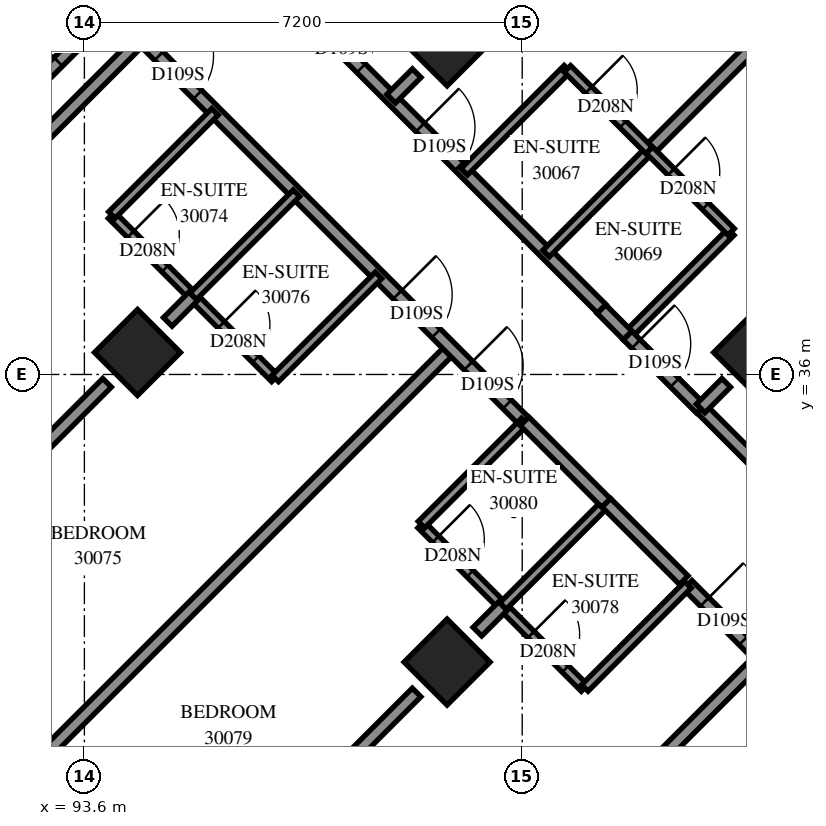
"""IFC4 building model, lengths in metres.
Left out: names, types, materials, properties, quantities, classifications, styles, units other than length and angle.
Written with IfcOpenShell. Run it as: python <this file> out.ifc"""

import sys

from ifc_helpers import new_model, si_unit, direction, frame, frame_2d, origin, origin_2d, place, context, subcontext, project, spatial, rectangle, extrude, element, fill, save


model = new_model("IFC4")
c1 = context("Model", 3, precision=1e-05, world=origin(), true_north=direction((0.0, 1.0)))
c2 = subcontext(c1, "Body", "Model", "MODEL_VIEW")
j1 = project(units=[si_unit("LENGTHUNIT", "METRE"), si_unit("PLANEANGLEUNIT", "RADIAN")], contexts=[c1])
p1 = place(None, origin())
s1 = spatial("IfcSite", under=j1, at=p1, CompositionType="ELEMENT")
p2 = place(p1, origin())
s2 = spatial("IfcBuilding", under=s1, at=p2, CompositionType="ELEMENT")
p3 = place(p2, frame((0.0, 0.0, 111.8)))
s3 = spatial("IfcBuildingStorey", under=s2, at=p3, CompositionType="ELEMENT", Elevation=111.8)
for number, where, z_axis, x_axis in (
    (1, (99.565, 41.453, 0.0), (0.0, 0.0, 1.0), (0.707, -0.707, 0.0)),
    (2, (94.474, 36.362, 0.0), (0.0, 0.0, 1.0), (0.707, -0.707, 0.0)),
    (3, (104.656, 36.362, 0.0), (0.0, 0.0, 1.0), (0.707, -0.707, 0.0)),
    (4, (99.565, 31.271, 0.0), (0.0, 0.0, 1.0), (0.707, -0.707, 0.0)),
):
    element("IfcColumn", number, at=place(p3, frame(where, z_axis=z_axis, x_axis=x_axis)), inside=s3, PredefinedType="COLUMN", context=c2, shape_type="SweptSolid", body=[
        extrude(rectangle(XDim=1.0, YDim=1.0, at=origin_2d()), origin(), (0.0, 0.0, 1.0), 3.1),
    ])
p4 = place(p3, frame((87.12, 38.625, -0.3), z_axis=(0.0, 0.0, 1.0), x_axis=(0.7071067812, 0.7071067812, 0.0)))
e5 = element("IfcWall", 5, at=p4, inside=s3, PredefinedType="SHEAR", context=c2, shape_type="SweptSolid", body=[
    extrude(rectangle(XDim=14.4, YDim=0.8, at=frame_2d((7.2, 0.0))), origin(), (0.0, 0.0, 1.0), 2.7),
])
p5 = place(p4, frame((4.55, 0.0, 0.3)))
e6 = element("IfcOpeningElement", 6, at=p5, cuts=e5, PredefinedType="OPENING", context=c2, shape_type="SweptSolid", body=[
    extrude(rectangle(XDim=1.1, YDim=2.1, at=frame_2d((0.55, 1.05))), frame((0.0, 0.41, 0.0), z_axis=(0.0, -1.0, 0.0), x_axis=(1.0, 0.0, 0.0)), (0.0, 0.0, 1.0), 0.82),
])
p6 = place(p4, frame((11.35, 0.0, 0.3)))
e7 = element("IfcOpeningElement", 7, at=p6, cuts=e5, PredefinedType="OPENING", context=c2, shape_type="SweptSolid", body=[
    extrude(rectangle(XDim=1.1, YDim=2.1, at=frame_2d((0.55, 1.05))), frame((0.0, 0.41, 0.0), z_axis=(0.0, -1.0, 0.0), x_axis=(1.0, 0.0, 0.0)), (0.0, 0.0, 1.0), 0.82),
])
p7 = place(p3, frame((96.474, 23.09, 0.0), z_axis=(0.0, 0.0, 1.0), x_axis=(0.7071067812, 0.7071067812, 0.0)))
e8 = element("IfcWall", 8, at=p7, inside=s3, PredefinedType="PARTITIONING", context=c2, shape_type="SweptSolid", body=[
    extrude(rectangle(XDim=11.67, YDim=0.2, at=frame_2d((5.835, 0.0))), origin(), (0.0, 0.0, 1.0), 3.1),
])
p8 = place(p3, frame((86.331, 33.312, 0.0), z_axis=(0.0, 0.0, 1.0), x_axis=(0.707102476, 0.7071110864, 0.0)))
e9 = element("IfcWall", 9, at=p8, inside=s3, PredefinedType="PARTITIONING", context=c2, shape_type="SweptSolid", body=[
    extrude(rectangle(XDim=11.614, YDim=0.2, at=frame_2d((5.807, 0.0))), origin(), (0.0, 0.0, 1.0), 3.1),
])
p9 = place(p3, frame((91.452, 28.25, 0.0), z_axis=(0.0, 0.0, 1.0), x_axis=(0.7071931897, 0.7070203621, 0.0)))
e10 = element("IfcWall", 10, at=p9, inside=s3, PredefinedType="PARTITIONING", context=c2, shape_type="SweptSolid", body=[
    extrude(rectangle(XDim=11.572, YDim=0.2, at=frame_2d((5.786, 0.0))), origin(), (0.0, 0.0, 1.0), 3.1),
])
p10 = place(p3, frame((86.835, 34.806, 0.0), z_axis=(0.0, 0.0, 1.0), x_axis=(0.7071067812, 0.7071067812, 0.0)))
e11 = element("IfcWall", 11, at=p10, inside=s3, PredefinedType="PARTITIONING", context=c2, shape_type="SweptSolid", body=[
    extrude(rectangle(XDim=10.201, YDim=0.2, at=frame_2d((5.1, 0.0))), origin(), (0.0, 0.0, 1.0), 3.1),
])
p11 = place(p10, frame((8.959, 0.0, 0.0)))
e12 = element("IfcOpeningElement", 12, at=p11, cuts=e11, PredefinedType="OPENING", context=c2, shape_type="SweptSolid", body=[
    extrude(rectangle(XDim=1.0, YDim=2.1, at=frame_2d((0.5, 1.05))), frame((0.0, 0.11, 0.0), z_axis=(0.0, -1.0, 0.0), x_axis=(1.0, 0.0, 0.0)), (0.0, 0.0, 1.0), 0.22),
])
p12 = place(p3, frame((94.047, 42.015, 0.0), z_axis=(0.0, 0.0, 1.0), x_axis=(0.7071067812, -0.7071067812, 0.0)))
e13 = element("IfcWall", 13, at=p12, inside=s3, PredefinedType="PARTITIONING", context=c2, shape_type="SweptSolid", body=[
    extrude(rectangle(XDim=9.6, YDim=0.2, at=frame_2d((4.8, 0.0))), origin(), (0.0, 0.0, 1.0), 3.1),
])
p13 = place(p12, frame((1.099, 0.0, 0.0)))
e14 = element("IfcOpeningElement", 14, at=p13, cuts=e13, PredefinedType="OPENING", context=c2, shape_type="SweptSolid", body=[
    extrude(rectangle(XDim=0.9, YDim=2.1, at=frame_2d((0.45, 1.05))), frame((0.0, 0.11, 0.0), z_axis=(0.0, -1.0, 0.0), x_axis=(1.0, 0.0, 0.0)), (0.0, 0.0, 1.0), 0.22),
])
p14 = place(p12, frame((6.649, 0.0, 0.0)))
e15 = element("IfcOpeningElement", 15, at=p14, cuts=e13, PredefinedType="OPENING", context=c2, shape_type="SweptSolid", body=[
    extrude(rectangle(XDim=0.9, YDim=2.1, at=frame_2d((0.45, 1.05))), frame((0.0, 0.11, 0.0), z_axis=(0.0, -1.0, 0.0), x_axis=(1.0, 0.0, 0.0)), (0.0, 0.0, 1.0), 0.22),
])
p15 = place(p12, frame((8.3, 0.0, 0.0)))
e16 = element("IfcOpeningElement", 16, at=p15, cuts=e13, PredefinedType="OPENING", context=c2, shape_type="SweptSolid", body=[
    extrude(rectangle(XDim=0.9, YDim=2.1, at=frame_2d((0.45, 1.05))), frame((0.0, 0.11, 0.0), z_axis=(0.0, -1.0, 0.0), x_axis=(1.0, 0.0, 0.0)), (0.0, 0.0, 1.0), 0.22),
])
p16 = place(p3, frame((96.103, 43.083, 0.0), z_axis=(0.0, 0.0, 1.0), x_axis=(0.7071067812, -0.7071067812, 0.0)))
e17 = element("IfcWall", 17, at=p16, inside=s3, PredefinedType="PARTITIONING", context=c2, shape_type="SweptSolid", body=[
    extrude(rectangle(XDim=8.491, YDim=0.2, at=frame_2d((4.245, 0.0))), origin(), (0.0, 0.0, 1.0), 3.1),
])
p17 = place(p16, frame((1.995, 0.0, 0.0)))
e18 = element("IfcOpeningElement", 18, at=p17, cuts=e17, PredefinedType="OPENING", context=c2, shape_type="SweptSolid", body=[
    extrude(rectangle(XDim=0.9, YDim=2.1, at=frame_2d((0.45, 1.05))), frame((0.0, 0.11, 0.0), z_axis=(0.0, -1.0, 0.0), x_axis=(1.0, 0.0, 0.0)), (0.0, 0.0, 1.0), 0.22),
])
p18 = place(p16, frame((4.27, 0.0, 0.0)))
e19 = element("IfcOpeningElement", 19, at=p18, cuts=e17, PredefinedType="OPENING", context=c2, shape_type="SweptSolid", body=[
    extrude(rectangle(XDim=0.9, YDim=2.1, at=frame_2d((0.45, 1.05))), frame((0.0, 0.11, 0.0), z_axis=(0.0, -1.0, 0.0), x_axis=(1.0, 0.0, 0.0)), (0.0, 0.0, 1.0), 0.22),
])
p19 = place(p3, frame((102.888, 39.687, 0.0), z_axis=(0.0, 0.0, 1.0), x_axis=(0.7072515706, 0.7069619621, 0.0)))
e20 = element("IfcWall", 20, at=p19, inside=s3, PredefinedType="PARTITIONING", context=c2, shape_type="SweptSolid", body=[
    extrude(rectangle(XDim=7.251, YDim=0.2, at=frame_2d((3.626, 0.0))), origin(), (0.0, 0.0, 1.0), 3.1),
])
p20 = place(p3, frame((108.831, 30.355, 0.0), z_axis=(0.0, 0.0, 1.0), x_axis=(-0.7073012053, 0.7069123036, 0.0)))
e21 = element("IfcWall", 21, at=p20, inside=s3, PredefinedType="PARTITIONING", context=c2, shape_type="SweptSolid", body=[
    extrude(rectangle(XDim=7.2, YDim=0.2, at=frame_2d((3.6, 0.0))), origin(), (0.0, 0.0, 1.0), 3.1),
])
p21 = place(p20, frame((4.125, 0.0, 0.0)))
e22 = element("IfcOpeningElement", 22, at=p21, cuts=e21, PredefinedType="OPENING", context=c2, shape_type="SweptSolid", body=[
    extrude(rectangle(XDim=1.0, YDim=2.1, at=frame_2d((0.5, 1.05))), frame((0.0, 0.11, 0.0), z_axis=(0.0, -1.0, 0.0), x_axis=(1.0, 0.0, 0.0)), (0.0, 0.0, 1.0), 0.22),
])
p22 = place(p20, frame((0.705, 0.0, 0.0)))
e23 = element("IfcOpeningElement", 23, at=p22, cuts=e21, PredefinedType="OPENING", context=c2, shape_type="SweptSolid", body=[
    extrude(rectangle(XDim=0.9, YDim=2.1, at=frame_2d((0.45, 1.05))), frame((0.0, 0.11, 0.0), z_axis=(0.0, -1.0, 0.0), x_axis=(1.0, 0.0, 0.0)), (0.0, 0.0, 1.0), 0.22),
])
p23 = place(p3, frame((89.881, 31.771, 0.0), z_axis=(0.0, 0.0, 1.0), x_axis=(0.7071067812, 0.7071067812, 0.0)))
e24 = element("IfcWall", 24, at=p23, inside=s3, PredefinedType="PARTITIONING", context=c2, shape_type="SweptSolid", body=[
    extrude(rectangle(XDim=5.787, YDim=0.2, at=frame_2d((2.893, 0.0))), origin(), (0.0, 0.0, 1.0), 3.1),
])
p24 = place(p3, frame((94.973, 26.681, 0.0), z_axis=(0.0, 0.0, 1.0), x_axis=(0.7071067812, 0.7071067812, 0.0)))
e25 = element("IfcWall", 25, at=p24, inside=s3, PredefinedType="PARTITIONING", context=c2, shape_type="SweptSolid", body=[
    extrude(rectangle(XDim=5.784, YDim=0.2, at=frame_2d((2.892, 0.0))), origin(), (0.0, 0.0, 1.0), 3.1),
])
p25 = place(p3, frame((103.521, 32.541, 0.0), z_axis=(0.0, 0.0, 1.0), x_axis=(0.7071067812, -0.7071067812, 0.0)))
e26 = element("IfcWall", 26, at=p25, inside=s3, PredefinedType="PARTITIONING", context=c2, shape_type="SweptSolid", body=[
    extrude(rectangle(XDim=5.301, YDim=0.2, at=frame_2d((2.65, 0.0))), origin(), (0.0, 0.0, 1.0), 3.1),
])
p26 = place(p25, frame((0.396, 0.0, 0.0)))
e27 = element("IfcOpeningElement", 27, at=p26, cuts=e26, PredefinedType="OPENING", context=c2, shape_type="SweptSolid", body=[
    extrude(rectangle(XDim=0.9, YDim=2.1, at=frame_2d((0.45, 1.05))), frame((0.0, 0.11, 0.0), z_axis=(0.0, -1.0, 0.0), x_axis=(1.0, 0.0, 0.0)), (0.0, 0.0, 1.0), 0.22),
])
p27 = place(p3, frame((99.137, 33.531, 0.0), z_axis=(0.0, 0.0, 1.0), x_axis=(0.7071067812, -0.7071067812, 0.0)))
e28 = element("IfcWall", 28, at=p27, inside=s3, PredefinedType="PARTITIONING", context=c2, shape_type="SweptSolid", body=[
    extrude(rectangle(XDim=3.801, YDim=0.15, at=frame_2d((1.901, 0.0))), origin(), (0.0, 0.0, 1.0), 3.1),
])
p28 = place(p27, frame((2.557, 0.0, 0.0)))
e29 = element("IfcOpeningElement", 29, at=p28, cuts=e28, PredefinedType="OPENING", context=c2, shape_type="SweptSolid", body=[
    extrude(rectangle(XDim=0.8, YDim=2.1, at=frame_2d((0.4, 1.05))), frame((0.0, 0.085, 0.0), z_axis=(0.0, -1.0, 0.0), x_axis=(1.0, 0.0, 0.0)), (0.0, 0.0, 1.0), 0.17),
])
p29 = place(p27, frame((0.339, 0.0, 0.0)))
e30 = element("IfcOpeningElement", 30, at=p29, cuts=e28, PredefinedType="OPENING", context=c2, shape_type="SweptSolid", body=[
    extrude(rectangle(XDim=0.8, YDim=2.1, at=frame_2d((0.4, 1.05))), frame((0.0, 0.085, 0.0), z_axis=(0.0, -1.0, 0.0), x_axis=(1.0, 0.0, 0.0)), (0.0, 0.0, 1.0), 0.17),
])
p30 = place(p3, frame((94.047, 38.621, 0.0), z_axis=(0.0, 0.0, 1.0), x_axis=(0.7071067812, -0.7071067812, 0.0)))
e31 = element("IfcWall", 31, at=p30, inside=s3, PredefinedType="PARTITIONING", context=c2, shape_type="SweptSolid", body=[
    extrude(rectangle(XDim=3.799, YDim=0.15, at=frame_2d((1.899, 0.0))), origin(), (0.0, 0.0, 1.0), 3.1),
])
p31 = place(p30, frame((0.444, 0.0, 0.0)))
e32 = element("IfcOpeningElement", 32, at=p31, cuts=e31, PredefinedType="OPENING", context=c2, shape_type="SweptSolid", body=[
    extrude(rectangle(XDim=0.8, YDim=2.1, at=frame_2d((0.4, 1.05))), frame((0.0, 0.085, 0.0), z_axis=(0.0, -1.0, 0.0), x_axis=(1.0, 0.0, 0.0)), (0.0, 0.0, 1.0), 0.17),
])
p32 = place(p30, frame((2.551, 0.0, 0.0)))
e33 = element("IfcOpeningElement", 33, at=p32, cuts=e31, PredefinedType="OPENING", context=c2, shape_type="SweptSolid", body=[
    extrude(rectangle(XDim=0.8, YDim=2.1, at=frame_2d((0.4, 1.05))), frame((0.0, 0.085, 0.0), z_axis=(0.0, -1.0, 0.0), x_axis=(1.0, 0.0, 0.0)), (0.0, 0.0, 1.0), 0.17),
])
p33 = place(p3, frame((102.533, 36.645, 0.0), z_axis=(0.0, 0.0, 1.0), x_axis=(0.7071067812, 0.7071067812, 0.0)))
e34 = element("IfcWall", 34, at=p33, inside=s3, PredefinedType="PARTITIONING", context=c2, shape_type="SweptSolid", body=[
    extrude(rectangle(XDim=2.401, YDim=0.15, at=frame_2d((1.201, 0.0))), origin(), (0.0, 0.0, 1.0), 3.1),
])
for number, where, z_axis, x_axis in (
    (35, (101.192, 37.988, 0.0), (0.0, 0.0, 1.0), (0.707, 0.708, 0.0)),
    (36, (95.389, 37.285, 0.0), (0.0, 0.0, 1.0), (0.708, 0.707, 0.0)),
    (37, (94.052, 38.622, 0.0), (0.0, 0.0, 1.0), (0.707, 0.708, 0.0)),
    (38, (96.739, 35.935, 0.0), (0.0, 0.0, 1.0), (0.708, 0.707, 0.0)),
    (39, (99.143, 33.531, 0.0), (0.0, 0.0, 1.0), (0.708, 0.707, 0.0)),
    (40, (101.83, 30.844, 0.0), (0.0, 0.0, 1.0), (0.707, 0.708, 0.0)),
):
    element("IfcWall", number, at=place(p3, frame(where, z_axis=z_axis, x_axis=x_axis)), inside=s3, PredefinedType="PARTITIONING", context=c2, shape_type="SweptSolid", body=[
        extrude(rectangle(XDim=2.4, YDim=0.15, at=frame_2d((1.2, 0.0))), origin(), (0.0, 0.0, 1.0), 3.1),
    ])
for number, where, z_axis, x_axis in (
    (41, (100.483, 32.191, 0.0), (0.0, 0.0, 1.0), (0.707, 0.707, 0.0)),
    (42, (99.847, 39.333, 0.0), (0.0, 0.0, 1.0), (0.707, 0.707, 0.0)),
):
    element("IfcWall", number, at=place(p3, frame(where, z_axis=z_axis, x_axis=x_axis)), inside=s3, PredefinedType="PARTITIONING", context=c2, shape_type="SweptSolid", body=[
        extrude(rectangle(XDim=2.398, YDim=0.15, at=frame_2d((1.199, 0.0))), origin(), (0.0, 0.0, 1.0), 3.1),
    ])
p34 = place(p3, frame((102.891, 39.69, 0.0), z_axis=(0.0, 0.0, 1.0), x_axis=(0.7071067812, -0.7071067812, 0.0)))
e43 = element("IfcWall", 43, at=p34, inside=s3, PredefinedType="PARTITIONING", context=c2, shape_type="SweptSolid", body=[
    extrude(rectangle(XDim=1.901, YDim=0.15, at=frame_2d((0.95, 0.0))), origin(), (0.0, 0.0, 1.0), 3.1),
])
p35 = place(p34, frame((0.505, 0.0, 0.0)))
e44 = element("IfcOpeningElement", 44, at=p35, cuts=e43, PredefinedType="OPENING", context=c2, shape_type="SweptSolid", body=[
    extrude(rectangle(XDim=0.8, YDim=2.1, at=frame_2d((0.4, 1.05))), frame((0.0, 0.085, 0.0), z_axis=(0.0, -1.0, 0.0), x_axis=(1.0, 0.0, 0.0)), (0.0, 0.0, 1.0), 0.17),
])
p36 = place(p3, frame((100.839, 35.231, 0.0), z_axis=(0.0, 0.0, 1.0), x_axis=(0.7065800724, -0.7076330979, 0.0)))
e45 = element("IfcWall", 45, at=p36, inside=s3, PredefinedType="PARTITIONING", context=c2, shape_type="SweptSolid", body=[
    extrude(rectangle(XDim=1.899, YDim=0.2, at=frame_2d((0.95, 0.0))), origin(), (0.0, 0.0, 1.0), 3.1),
])
p37 = place(p3, frame((101.543, 41.027, 0.0), z_axis=(0.0, 0.0, 1.0), x_axis=(0.7076330979, -0.7065800724, 0.0)))
e46 = element("IfcWall", 46, at=p37, inside=s3, PredefinedType="PARTITIONING", context=c2, shape_type="SweptSolid", body=[
    extrude(rectangle(XDim=1.899, YDim=0.15, at=frame_2d((0.95, 0.0))), origin(), (0.0, 0.0, 1.0), 3.1),
])
p38 = place(p37, frame((0.493, 0.0, 0.0)))
e47 = element("IfcOpeningElement", 47, at=p38, cuts=e46, PredefinedType="OPENING", context=c2, shape_type="SweptSolid", body=[
    extrude(rectangle(XDim=0.8, YDim=2.1, at=frame_2d((0.4, 1.05))), frame((0.0, 0.085, 0.0), z_axis=(0.0, -1.0, 0.0), x_axis=(1.0, 0.0, 0.0)), (0.0, 0.0, 1.0), 0.17),
])
p39 = place(p3, frame((102.183, 33.889, 0.0), z_axis=(0.0, 0.0, 1.0), x_axis=(0.7076620277, -0.7065510983, 0.0)))
e48 = element("IfcWall", 48, at=p39, inside=s3, PredefinedType="PARTITIONING", context=c2, shape_type="SweptSolid", body=[
    extrude(rectangle(XDim=1.8, YDim=0.2, at=frame_2d((0.9, 0.0))), origin(), (0.0, 0.0, 1.0), 3.1),
])
p40 = place(p3, frame((102.531, 36.641, 0.0), z_axis=(0.0, 0.0, 1.0), x_axis=(0.7071067812, -0.7071067812, 0.0)))
e49 = element("IfcWall", 49, at=p40, inside=s3, PredefinedType="PARTITIONING", context=c2, shape_type="SweptSolid", body=[
    extrude(rectangle(XDim=1.7, YDim=0.2, at=frame_2d((0.85, 0.0))), origin(), (0.0, 0.0, 1.0), 3.1),
])
p41 = place(p40, frame((0.198, 0.0, 0.0)))
e50 = element("IfcOpeningElement", 50, at=p41, cuts=e49, PredefinedType="OPENING", context=c2, shape_type="SweptSolid", body=[
    extrude(rectangle(XDim=0.9, YDim=2.1, at=frame_2d((0.45, 1.05))), frame((0.0, 0.11, 0.0), z_axis=(0.0, -1.0, 0.0), x_axis=(1.0, 0.0, 0.0)), (0.0, 0.0, 1.0), 0.22),
])
p42 = place(p3, frame((102.103, 37.075, 0.0), z_axis=(0.0, 0.0, 1.0), x_axis=(0.7054642634, -0.7087454925, 0.0)))
e51 = element("IfcWall", 51, at=p42, inside=s3, PredefinedType="PARTITIONING", context=c2, shape_type="SweptSolid", body=[
    extrude(rectangle(XDim=0.61, YDim=0.2, at=frame_2d((0.305, 0.0))), origin(), (0.0, 0.0, 1.0), 3.1),
])
for number, where, z_axis, x_axis in (
    (52, (98.645, 40.535, 0.0), (0.0, 0.0, 1.0), (0.707, 0.707, 0.0)),
    (53, (100.063, 31.771, 0.0), (0.0, 0.0, 1.0), (0.707, 0.707, 0.0)),
    (54, (103.735, 35.443, 0.0), (0.0, 0.0, 1.0), (0.707, 0.707, 0.0)),
):
    element("IfcWall", number, at=place(p3, frame(where, z_axis=z_axis, x_axis=x_axis)), inside=s3, PredefinedType="PARTITIONING", context=c2, shape_type="SweptSolid", body=[
        extrude(rectangle(XDim=0.594, YDim=0.2, at=frame_2d((0.297, 0.0))), origin(), (0.0, 0.0, 1.0), 3.1),
    ])
p43 = place(p3, frame((94.971, 36.865, 0.0), z_axis=(0.0, 0.0, 1.0), x_axis=(0.7054171665, 0.7087923682, 0.0)))
e55 = element("IfcWall", 55, at=p43, inside=s3, PredefinedType="PARTITIONING", context=c2, shape_type="SweptSolid", body=[
    extrude(rectangle(XDim=0.593, YDim=0.2, at=frame_2d((0.296, 0.0))), origin(), (0.0, 0.0, 1.0), 3.1),
])
p44 = place(p17, origin())
e56 = element("IfcDoor", 56, at=p44, inside=s3, OperationType="SINGLE_SWING_RIGHT", PredefinedType="DOOR", context=c2, shape_type="SweptSolid", body=[
    extrude(rectangle(XDim=0.9, YDim=2.1, at=frame_2d((0.45, 1.05))), frame((0.0, 0.025, 0.0), z_axis=(0.0, -1.0, 0.0), x_axis=(1.0, 0.0, 0.0)), (0.0, 0.0, 1.0), 0.05),
])
fill(e18, e56)
p45 = place(p18, origin())
e57 = element("IfcDoor", 57, at=p45, inside=s3, OperationType="SINGLE_SWING_LEFT", PredefinedType="DOOR", context=c2, shape_type="SweptSolid", body=[
    extrude(rectangle(XDim=0.9, YDim=2.1, at=frame_2d((0.45, 1.05))), frame((0.0, 0.025, 0.0), z_axis=(0.0, -1.0, 0.0), x_axis=(1.0, 0.0, 0.0)), (0.0, 0.0, 1.0), 0.05),
])
fill(e19, e57)
p46 = place(p38, origin())
e58 = element("IfcDoor", 58, at=p46, inside=s3, OperationType="SINGLE_SWING_RIGHT", PredefinedType="DOOR", context=c2, shape_type="SweptSolid", body=[
    extrude(rectangle(XDim=0.8, YDim=2.1, at=frame_2d((0.4, 1.05))), frame((0.0, 0.025, 0.0), z_axis=(0.0, -1.0, 0.0), x_axis=(1.0, 0.0, 0.0)), (0.0, 0.0, 1.0), 0.05),
])
fill(e47, e58)
p47 = place(p41, origin())
e59 = element("IfcDoor", 59, at=p47, inside=s3, OperationType="SINGLE_SWING_RIGHT", PredefinedType="DOOR", context=c2, shape_type="SweptSolid", body=[
    extrude(rectangle(XDim=0.9, YDim=2.1, at=frame_2d((0.45, 1.05))), frame((0.0, 0.025, 0.0), z_axis=(0.0, -1.0, 0.0), x_axis=(1.0, 0.0, 0.0)), (0.0, 0.0, 1.0), 0.05),
])
fill(e50, e59)
p48 = place(p35, origin())
e60 = element("IfcDoor", 60, at=p48, inside=s3, OperationType="SINGLE_SWING_RIGHT", PredefinedType="DOOR", context=c2, shape_type="SweptSolid", body=[
    extrude(rectangle(XDim=0.8, YDim=2.1, at=frame_2d((0.4, 1.05))), frame((0.0, 0.025, 0.0), z_axis=(0.0, -1.0, 0.0), x_axis=(1.0, 0.0, 0.0)), (0.0, 0.0, 1.0), 0.05),
])
fill(e44, e60)
p49 = place(p11, origin())
e61 = element("IfcDoor", 61, at=p49, inside=s3, OperationType="SINGLE_SWING_LEFT", PredefinedType="DOOR", context=c2, shape_type="SweptSolid", body=[
    extrude(rectangle(XDim=1.0, YDim=2.1, at=frame_2d((0.5, 1.05))), frame((0.0, 0.025, 0.0), z_axis=(0.0, -1.0, 0.0), x_axis=(1.0, 0.0, 0.0)), (0.0, 0.0, 1.0), 0.05),
])
fill(e12, e61)
p50 = place(p13, origin())
e62 = element("IfcDoor", 62, at=p50, inside=s3, OperationType="SINGLE_SWING_LEFT", PredefinedType="DOOR", context=c2, shape_type="SweptSolid", body=[
    extrude(rectangle(XDim=0.9, YDim=2.1, at=frame_2d((0.45, 1.05))), frame((0.0, 0.025, 0.0), z_axis=(0.0, -1.0, 0.0), x_axis=(1.0, 0.0, 0.0)), (0.0, 0.0, 1.0), 0.05),
])
fill(e14, e62)
p51 = place(p31, origin())
e63 = element("IfcDoor", 63, at=p51, inside=s3, OperationType="SINGLE_SWING_RIGHT", PredefinedType="DOOR", context=c2, shape_type="SweptSolid", body=[
    extrude(rectangle(XDim=0.8, YDim=2.1, at=frame_2d((0.4, 1.05))), frame((0.0, 0.025, 0.0), z_axis=(0.0, -1.0, 0.0), x_axis=(1.0, 0.0, 0.0)), (0.0, 0.0, 1.0), 0.05),
])
fill(e32, e63)
p52 = place(p14, origin())
e64 = element("IfcDoor", 64, at=p52, inside=s3, OperationType="SINGLE_SWING_RIGHT", PredefinedType="DOOR", context=c2, shape_type="SweptSolid", body=[
    extrude(rectangle(XDim=0.9, YDim=2.1, at=frame_2d((0.45, 1.05))), frame((0.0, 0.025, 0.0), z_axis=(0.0, -1.0, 0.0), x_axis=(1.0, 0.0, 0.0)), (0.0, 0.0, 1.0), 0.05),
])
fill(e15, e64)
p53 = place(p32, origin())
e65 = element("IfcDoor", 65, at=p53, inside=s3, OperationType="SINGLE_SWING_RIGHT", PredefinedType="DOOR", context=c2, shape_type="SweptSolid", body=[
    extrude(rectangle(XDim=0.8, YDim=2.1, at=frame_2d((0.4, 1.05))), frame((0.0, 0.025, 0.0), z_axis=(0.0, -1.0, 0.0), x_axis=(1.0, 0.0, 0.0)), (0.0, 0.0, 1.0), 0.05),
])
fill(e33, e65)
p54 = place(p26, origin())
e66 = element("IfcDoor", 66, at=p54, inside=s3, OperationType="SINGLE_SWING_RIGHT", PredefinedType="DOOR", context=c2, shape_type="SweptSolid", body=[
    extrude(rectangle(XDim=0.9, YDim=2.1, at=frame_2d((0.45, 1.05))), frame((0.0, 0.025, 0.0), z_axis=(0.0, -1.0, 0.0), x_axis=(1.0, 0.0, 0.0)), (0.0, 0.0, 1.0), 0.05),
])
fill(e27, e66)
p55 = place(p28, origin())
e67 = element("IfcDoor", 67, at=p55, inside=s3, OperationType="SINGLE_SWING_RIGHT", PredefinedType="DOOR", context=c2, shape_type="SweptSolid", body=[
    extrude(rectangle(XDim=0.8, YDim=2.1, at=frame_2d((0.4, 1.05))), frame((0.0, 0.025, 0.0), z_axis=(0.0, -1.0, 0.0), x_axis=(1.0, 0.0, 0.0)), (0.0, 0.0, 1.0), 0.05),
])
fill(e29, e67)
p56 = place(p15, origin())
e68 = element("IfcDoor", 68, at=p56, inside=s3, OperationType="SINGLE_SWING_LEFT", PredefinedType="DOOR", context=c2, shape_type="SweptSolid", body=[
    extrude(rectangle(XDim=0.9, YDim=2.1, at=frame_2d((0.45, 1.05))), frame((0.0, 0.025, 0.0), z_axis=(0.0, -1.0, 0.0), x_axis=(1.0, 0.0, 0.0)), (0.0, 0.0, 1.0), 0.05),
])
fill(e16, e68)
p57 = place(p29, origin())
e69 = element("IfcDoor", 69, at=p57, inside=s3, OperationType="SINGLE_SWING_RIGHT", PredefinedType="DOOR", context=c2, shape_type="SweptSolid", body=[
    extrude(rectangle(XDim=0.8, YDim=2.1, at=frame_2d((0.4, 1.05))), frame((0.0, 0.025, 0.0), z_axis=(0.0, -1.0, 0.0), x_axis=(1.0, 0.0, 0.0)), (0.0, 0.0, 1.0), 0.05),
])
fill(e30, e69)
save(model, sys.argv[1])
